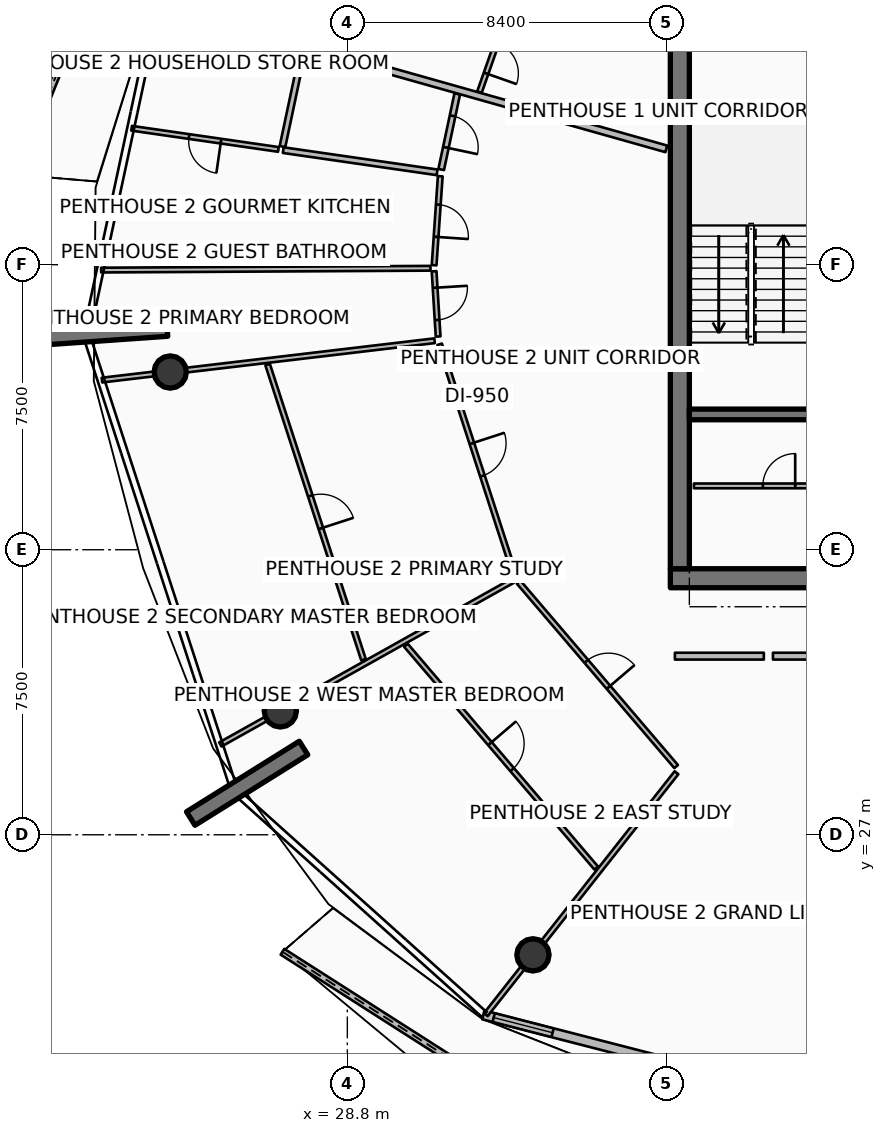
"""IFC4 building model, lengths in metres.
Left out: names, types, materials, properties, quantities, classifications, styles, units other than length and angle.
Written with IfcOpenShell. Run it as: python <this file> out.ifc"""

import sys

from ifc_helpers import new_model, si_unit, direction, frame, frame_2d, origin, origin_2d, place, context, subcontext, project, spatial, polyline, rectangle, circle, outline, extrude, element, fill, save


model = new_model("IFC4")
c1 = context("Model", 3, precision=1e-05, world=origin(), true_north=direction((0.0, 1.0)))
c2 = subcontext(c1, "Body", "Model", "MODEL_VIEW")
j1 = project(units=[si_unit("LENGTHUNIT", "METRE"), si_unit("PLANEANGLEUNIT", "RADIAN")], contexts=[c1])
p1 = place(None, origin())
s1 = spatial("IfcSite", under=j1, at=p1, CompositionType="ELEMENT")
p2 = place(p1, origin())
s2 = spatial("IfcBuilding", under=s1, at=p2, CompositionType="ELEMENT")
p3 = place(p2, frame((0.0, 0.0, 330.5)))
s3 = spatial("IfcBuildingStorey", under=s2, at=p3, CompositionType="ELEMENT", Elevation=330.5)
p4 = place(p3, frame((37.3, 33.75, 0.0), z_axis=(0.0, 0.0, 1.0), x_axis=(1.0, 0.0, 0.0)))
e1 = element("IfcWall", 1, at=p4, inside=s3, PredefinedType="SHEAR", context=c2, shape_type="SweptSolid", body=[
    extrude(rectangle(XDim=9.6, YDim=0.5, at=frame_2d((4.8, 0.0))), origin(), (0.0, 0.0, 1.0), 4.2),
])
p5 = place(p3, frame((37.55, 34.0, 0.0), z_axis=(0.0, 0.0, 1.0), x_axis=(0.0, 1.0, 0.0)))
e2 = element("IfcWall", 2, at=p5, inside=s3, PredefinedType="SHEAR", context=c2, shape_type="SweptSolid", body=[
    extrude(rectangle(XDim=16.0, YDim=0.5, at=frame_2d((8.0, 0.0))), origin(), (0.0, 0.0, 1.0), 4.2),
])
for number, where, z_axis, x_axis in (
    (3, (37.8, 38.06, 0.0), (0.0, 0.0, 1.0), (1.0, 0.0, 0.0)),
    (4, (37.8, 45.94, 0.0), (0.0, 0.0, 1.0), (1.0, 0.0, 0.0)),
):
    element("IfcWall", number, at=place(p3, frame(where, z_axis=z_axis, x_axis=x_axis)), inside=s3, PredefinedType="SHEAR", context=c2, shape_type="SweptSolid", body=[
        extrude(rectangle(XDim=3.5, YDim=0.28, at=frame_2d((1.75, 0.0))), origin(), (0.0, 0.0, 1.0), 4.2),
    ])
for number, where, z_axis, x_axis in (
    (5, (24.059, 40.326, 0.0), (0.0, 0.0, 1.0), (-0.998, -0.07, 0.0)),
    (6, (27.647, 29.282, 0.0), (0.0, 0.0, 1.0), (-0.848, -0.53, 0.0)),
):
    element("IfcWall", number, at=place(p3, frame(where, z_axis=z_axis, x_axis=x_axis)), inside=s3, PredefinedType="SOLIDWALL", context=c2, shape_type="SweptSolid", body=[
        extrude(rectangle(XDim=3.5, YDim=0.42, at=frame_2d((1.75, 0.0))), origin(), (0.0, 0.0, 1.0), 4.2),
    ])
for number, where, z_axis, x_axis in (
    (7, (24.14, 39.176, 0.0), (0.0, 0.0, 1.0), (1.0, 0.0, 0.0)),
    (8, (27.037, 30.26, 0.0), (0.0, 0.0, 1.0), (1.0, 0.0, 0.0)),
    (9, (33.684, 23.841, 0.0), (0.0, 0.0, 1.0), (1.0, 0.0, 0.0)),
):
    element("IfcColumn", number, at=place(p3, frame(where, z_axis=z_axis, x_axis=x_axis)), inside=s3, PredefinedType="COLUMN", context=c2, shape_type="SweptSolid", body=[
        extrude(circle(Radius=0.425, at=origin_2d()), origin(), (0.0, 0.0, 1.0), 3.94),
    ])
p6 = place(p3, frame((23.993, 54.098, 0.0), z_axis=(0.0, 0.0, 1.0), x_axis=(-0.372269858955, -0.928124534809, 0.0)))
e10 = element("IfcWall", 10, at=p6, inside=s3, PredefinedType="PARAPET", context=c2, shape_type="SweptSolid", body=[
    extrude(outline(polyline([(0.0, 0.0), (10.483, 0.0), (10.483, 1.497), (5.242, 1.696), (0.0, 1.832), (0.0, 0.0)])), frame((0.0, 0.09, 0.0), z_axis=(0.0, -1.0, 0.0), x_axis=(1.0, 0.0, 0.0)), (0.0, 0.0, 1.0), 0.18),
])
p7 = place(p3, frame((27.093, 23.922, 0.0), z_axis=(0.0, 0.0, 1.0), x_axis=(0.842921526724, -0.538036522725, 0.0)))
e11 = element("IfcWall", 11, at=p7, inside=s3, PredefinedType="PARAPET", context=c2, shape_type="SweptSolid", body=[
    extrude(outline(polyline([(0.0, 0.0), (10.35, 0.0), (10.35, 1.632), (5.175, 1.418), (0.0, 1.233), (0.0, 0.0)])), frame((0.0, 0.09, 0.0), z_axis=(0.0, -1.0, 0.0), x_axis=(1.0, 0.0, 0.0)), (0.0, 0.0, 1.0), 0.18),
])
p8 = place(p3, frame((32.38, 22.26, 0.0), z_axis=(0.0, 0.0, 1.0), x_axis=(0.968389062354, -0.249444630957, 0.0)))
e12 = element("IfcWall", 12, at=p8, inside=s3, PredefinedType="SOLIDWALL", context=c2, shape_type="SweptSolid", body=[
    extrude(rectangle(XDim=9.678, YDim=0.24, at=frame_2d((4.839, 0.0))), origin(), (0.0, 0.0, 1.0), 2.89),
])
p9 = place(p8, frame((7.458, 0.0, 0.0)))
e13 = element("IfcOpeningElement", 13, at=p9, cuts=e12, PredefinedType="OPENING", context=c2, shape_type="SweptSolid", body=[
    extrude(rectangle(XDim=1.45, YDim=2.15, at=frame_2d((0.725, 1.075))), frame((0.0, 0.13, 0.0), z_axis=(0.0, -1.0, 0.0), x_axis=(1.0, 0.0, 0.0)), (0.0, 0.0, 1.0), 0.26),
])
p10 = place(p8, frame((0.28, 0.0, 0.65)))
e14 = element("IfcOpeningElement", 14, at=p10, cuts=e12, PredefinedType="OPENING", context=c2, shape_type="SweptSolid", body=[
    extrude(rectangle(XDim=1.6, YDim=1.5, at=frame_2d((0.8, 0.75))), frame((0.0, 0.13, 0.0), z_axis=(0.0, -1.0, 0.0), x_axis=(1.0, 0.0, 0.0)), (0.0, 0.0, 1.0), 0.26),
])
p11 = place(p3, frame((37.92, 36.18, 0.0), z_axis=(0.0, 0.0, 1.0), x_axis=(1.0, 0.0, 0.0)))
e15 = element("IfcWall", 15, at=p11, inside=s3, PredefinedType="PARTITIONING", context=c2, shape_type="SweptSolid", body=[
    extrude(rectangle(XDim=4.48, YDim=0.125, at=frame_2d((2.24, 0.0))), origin(), (0.0, 0.0, 1.0), 3.38),
])
p12 = place(p11, frame((1.815, 0.0, 0.0)))
e16 = element("IfcOpeningElement", 16, at=p12, cuts=e15, PredefinedType="OPENING", context=c2, shape_type="SweptSolid", body=[
    extrude(rectangle(XDim=0.85, YDim=2.06, at=frame_2d((0.425, 1.03))), frame((0.0, 0.073, 0.0), z_axis=(0.0, -1.0, 0.0), x_axis=(1.0, 0.0, 0.0)), (0.0, 0.0, 1.0), 0.145),
])
p13 = place(p3, frame((37.194, 45.048, 0.0), z_axis=(0.0, 0.0, 1.0), x_axis=(-0.962457024049, 0.271434111451, 0.0)))
e17 = element("IfcWall", 17, at=p13, inside=s3, PredefinedType="PARTITIONING", context=c2, shape_type="SweptSolid", body=[
    extrude(rectangle(XDim=13.799, YDim=0.18, at=frame_2d((6.9, 0.0))), origin(), (0.0, 0.0, 1.0), 3.38),
])
p14 = place(p3, frame((32.907, 48.332, 0.0), z_axis=(0.0, 0.0, 1.0), x_axis=(-0.332128336942, -0.943234206229, 0.0)))
e18 = element("IfcWall", 18, at=p14, inside=s3, PredefinedType="PARTITIONING", context=c2, shape_type="SweptSolid", body=[
    extrude(rectangle(XDim=1.902, YDim=0.125, at=frame_2d((0.951, 0.0))), origin(), (0.0, 0.0, 1.0), 3.38),
])
p15 = place(p14, frame((0.526, 0.0, 0.0)))
e19 = element("IfcOpeningElement", 19, at=p15, cuts=e18, PredefinedType="OPENING", context=c2, shape_type="SweptSolid", body=[
    extrude(rectangle(XDim=0.85, YDim=2.06, at=frame_2d((0.425, 1.03))), frame((0.0, 0.073, 0.0), z_axis=(0.0, -1.0, 0.0), x_axis=(1.0, 0.0, 0.0)), (0.0, 0.0, 1.0), 0.145),
])
p16 = place(p3, frame((40.0, 31.7, 0.0), z_axis=(0.0, 0.0, 1.0), x_axis=(1.0, 0.0, 0.0)))
e20 = element("IfcWall", 20, at=p16, inside=s3, PredefinedType="PARTITIONING", context=c2, shape_type="SweptSolid", body=[
    extrude(rectangle(XDim=4.975, YDim=0.18, at=frame_2d((2.488, 0.0))), origin(), (0.0, 0.0, 1.0), 3.38),
])
p17 = place(p16, frame((1.938, 0.0, 0.0)))
e21 = element("IfcOpeningElement", 21, at=p17, cuts=e20, PredefinedType="OPENING", context=c2, shape_type="SweptSolid", body=[
    extrude(rectangle(XDim=1.1, YDim=2.1, at=frame_2d((0.55, 1.05))), frame((0.0, 0.1, 0.0), z_axis=(0.0, -1.0, 0.0), x_axis=(1.0, 0.0, 0.0)), (0.0, 0.0, 1.0), 0.2),
])
p18 = place(p3, frame((31.692, 46.496, 0.0), z_axis=(0.0, 0.0, 1.0), x_axis=(-0.207455496804, -0.978244456588, 0.0)))
e22 = element("IfcWall", 22, at=p18, inside=s3, PredefinedType="PARTITIONING", context=c2, shape_type="SweptSolid", body=[
    extrude(rectangle(XDim=2.035, YDim=0.15, at=frame_2d((1.017, 0.0))), origin(), (0.0, 0.0, 1.0), 3.38),
])
p19 = place(p18, frame((0.592, 0.0, 0.0)))
e23 = element("IfcOpeningElement", 23, at=p19, cuts=e22, PredefinedType="OPENING", context=c2, shape_type="SweptSolid", body=[
    extrude(rectangle(XDim=0.85, YDim=2.06, at=frame_2d((0.425, 1.03))), frame((0.0, 0.085, 0.0), z_axis=(0.0, -1.0, 0.0), x_axis=(1.0, 0.0, 0.0)), (0.0, 0.0, 1.0), 0.17),
])
p20 = place(p3, frame((27.631, 47.641, 0.0), z_axis=(0.0, 0.0, 1.0), x_axis=(-0.207597158551, -0.978214403779, 0.0)))
e24 = element("IfcWall", 24, at=p20, inside=s3, PredefinedType="PARTITIONING", context=c2, shape_type="SweptSolid", body=[
    extrude(rectangle(XDim=2.59, YDim=0.15, at=frame_2d((1.295, 0.0))), origin(), (0.0, 0.0, 1.0), 3.38),
])
p21 = place(p3, frame((31.162, 44.43, 0.0), z_axis=(0.0, 0.0, 1.0), x_axis=(-0.989744304981, 0.142850308916, 0.0)))
e25 = element("IfcWall", 25, at=p21, inside=s3, PredefinedType="PARTITIONING", context=c2, shape_type="SweptSolid", body=[
    extrude(rectangle(XDim=4.09, YDim=0.15, at=frame_2d((2.045, 0.0))), origin(), (0.0, 0.0, 1.0), 3.38),
])
p22 = place(p3, frame((26.986, 45.033, 0.0), z_axis=(0.0, 0.0, 1.0), x_axis=(-0.989744483193, 0.142849074164, 0.0)))
e26 = element("IfcWall", 26, at=p22, inside=s3, PredefinedType="PARTITIONING", context=c2, shape_type="SweptSolid", body=[
    extrude(rectangle(XDim=3.902, YDim=0.125, at=frame_2d((1.951, 0.0))), origin(), (0.0, 0.0, 1.0), 3.38),
])
p23 = place(p22, frame((1.526, 0.0, 0.0)))
e27 = element("IfcOpeningElement", 27, at=p23, cuts=e26, PredefinedType="OPENING", context=c2, shape_type="SweptSolid", body=[
    extrude(rectangle(XDim=0.85, YDim=2.06, at=frame_2d((0.425, 1.03))), frame((0.0, 0.073, 0.0), z_axis=(0.0, -1.0, 0.0), x_axis=(1.0, 0.0, 0.0)), (0.0, 0.0, 1.0), 0.145),
])
p24 = place(p3, frame((30.988, 41.906, 0.0), z_axis=(0.0, 0.0, 1.0), x_axis=(-0.999984908948, -0.005493803382, 0.0)))
e28 = element("IfcWall", 28, at=p24, inside=s3, PredefinedType="PARTITIONING", context=c2, shape_type="SweptSolid", body=[
    extrude(rectangle(XDim=8.666, YDim=0.125, at=frame_2d((4.333, 0.0))), origin(), (0.0, 0.0, 1.0), 3.38),
])
p25 = place(p3, frame((31.245, 44.327, 0.0), z_axis=(0.0, 0.0, 1.0), x_axis=(-0.068873502497, -0.997625400967, 0.0)))
e29 = element("IfcWall", 29, at=p25, inside=s3, PredefinedType="PARTITIONING", context=c2, shape_type="SweptSolid", body=[
    extrude(rectangle(XDim=2.347, YDim=0.125, at=frame_2d((1.173, 0.0))), origin(), (0.0, 0.0, 1.0), 3.38),
])
p26 = place(p25, frame((0.748, 0.0, 0.0)))
e30 = element("IfcOpeningElement", 30, at=p26, cuts=e29, PredefinedType="OPENING", context=c2, shape_type="SweptSolid", body=[
    extrude(rectangle(XDim=0.85, YDim=2.06, at=frame_2d((0.425, 1.03))), frame((0.0, 0.073, 0.0), z_axis=(0.0, -1.0, 0.0), x_axis=(1.0, 0.0, 0.0)), (0.0, 0.0, 1.0), 0.145),
])
p27 = place(p3, frame((31.083, 41.827, 0.0), z_axis=(0.0, 0.0, 1.0), x_axis=(0.061626842896, -0.998099259711, 0.0)))
e31 = element("IfcWall", 31, at=p27, inside=s3, PredefinedType="PARTITIONING", context=c2, shape_type="SweptSolid", body=[
    extrude(rectangle(XDim=1.719, YDim=0.125, at=frame_2d((0.86, 0.0))), origin(), (0.0, 0.0, 1.0), 3.38),
])
p28 = place(p27, frame((0.435, 0.0, 0.0)))
e32 = element("IfcOpeningElement", 32, at=p28, cuts=e31, PredefinedType="OPENING", context=c2, shape_type="SweptSolid", body=[
    extrude(rectangle(XDim=0.85, YDim=2.06, at=frame_2d((0.425, 1.03))), frame((0.0, 0.073, 0.0), z_axis=(0.0, -1.0, 0.0), x_axis=(1.0, 0.0, 0.0)), (0.0, 0.0, 1.0), 0.145),
])
p29 = place(p3, frame((31.096, 39.999, 0.0), z_axis=(0.0, 0.0, 1.0), x_axis=(-0.993069250604, -0.117530691761, 0.0)))
e33 = element("IfcWall", 33, at=p29, inside=s3, PredefinedType="PARTITIONING", context=c2, shape_type="SweptSolid", body=[
    extrude(rectangle(XDim=8.814, YDim=0.125, at=frame_2d((4.407, 0.0))), origin(), (0.0, 0.0, 1.0), 3.38),
])
p30 = place(p3, frame((31.229, 39.906, 0.0), z_axis=(0.0, 0.0, 1.0), x_axis=(0.309023798792, -0.951054305379, 0.0)))
e34 = element("IfcWall", 34, at=p30, inside=s3, PredefinedType="PARTITIONING", context=c2, shape_type="SweptSolid", body=[
    extrude(rectangle(XDim=6.383, YDim=0.125, at=frame_2d((3.191, 0.0))), origin(), (0.0, 0.0, 1.0), 3.38),
])
p31 = place(p30, frame((2.741, 0.0, 0.0)))
e35 = element("IfcOpeningElement", 35, at=p31, cuts=e34, PredefinedType="OPENING", context=c2, shape_type="SweptSolid", body=[
    extrude(rectangle(XDim=0.9, YDim=2.08, at=frame_2d((0.45, 1.04))), frame((0.0, 0.073, 0.0), z_axis=(0.0, -1.0, 0.0), x_axis=(1.0, 0.0, 0.0)), (0.0, 0.0, 1.0), 0.145),
])
p32 = place(p3, frame((26.703, 39.371, 0.0), z_axis=(0.0, 0.0, 1.0), x_axis=(0.309021134762, -0.951055170992, 0.0)))
e36 = element("IfcWall", 36, at=p32, inside=s3, PredefinedType="PARTITIONING", context=c2, shape_type="SweptSolid", body=[
    extrude(rectangle(XDim=8.161, YDim=0.125, at=frame_2d((4.081, 0.0))), origin(), (0.0, 0.0, 1.0), 3.38),
])
p33 = place(p32, frame((3.631, 0.0, 0.0)))
e37 = element("IfcOpeningElement", 37, at=p33, cuts=e36, PredefinedType="OPENING", context=c2, shape_type="SweptSolid", body=[
    extrude(rectangle(XDim=0.9, YDim=2.08, at=frame_2d((0.45, 1.04))), frame((0.0, 0.073, 0.0), z_axis=(0.0, -1.0, 0.0), x_axis=(1.0, 0.0, 0.0)), (0.0, 0.0, 1.0), 0.145),
])
p34 = place(p3, frame((37.42, 31.7, 0.0), z_axis=(0.0, 0.0, 1.0), x_axis=(1.0, 0.0, 0.0)))
e38 = element("IfcWall", 38, at=p34, inside=s3, PredefinedType="PARTITIONING", context=c2, shape_type="SweptSolid", body=[
    extrude(rectangle(XDim=2.34, YDim=0.18, at=frame_2d((1.17, 0.0))), origin(), (0.0, 0.0, 1.0), 3.38),
])
p35 = place(p3, frame((33.148, 33.683, 0.0), z_axis=(0.0, 0.0, 1.0), x_axis=(-0.872504598877, -0.488605899409, 0.0)))
e39 = element("IfcWall", 39, at=p35, inside=s3, PredefinedType="PARTITIONING", context=c2, shape_type="SweptSolid", body=[
    extrude(rectangle(XDim=8.814, YDim=0.125, at=frame_2d((4.407, 0.0))), origin(), (0.0, 0.0, 1.0), 3.38),
])
p36 = place(p3, frame((37.462, 28.632, 0.0), z_axis=(0.0, 0.0, 1.0), x_axis=(-0.619099165969, -0.78531281837, 0.0)))
e40 = element("IfcWall", 40, at=p36, inside=s3, PredefinedType="PARTITIONING", context=c2, shape_type="SweptSolid", body=[
    extrude(rectangle(XDim=8.105, YDim=0.125, at=frame_2d((4.052, 0.0))), origin(), (0.0, 0.0, 1.0), 3.38),
])
p37 = place(p3, frame((33.307, 33.648, 0.0), z_axis=(0.0, 0.0, 1.0), x_axis=(0.649467421322, -0.760389419075, 0.0)))
e41 = element("IfcWall", 41, at=p37, inside=s3, PredefinedType="PARTITIONING", context=c2, shape_type="SweptSolid", body=[
    extrude(rectangle(XDim=6.383, YDim=0.125, at=frame_2d((3.191, 0.0))), origin(), (0.0, 0.0, 1.0), 3.38),
])
p38 = place(p37, frame((2.741, 0.0, 0.0)))
e42 = element("IfcOpeningElement", 42, at=p38, cuts=e41, PredefinedType="OPENING", context=c2, shape_type="SweptSolid", body=[
    extrude(rectangle(XDim=0.9, YDim=2.08, at=frame_2d((0.45, 1.04))), frame((0.0, 0.073, 0.0), z_axis=(0.0, -1.0, 0.0), x_axis=(1.0, 0.0, 0.0)), (0.0, 0.0, 1.0), 0.145),
])
p39 = place(p3, frame((30.341, 31.987, 0.0), z_axis=(0.0, 0.0, 1.0), x_axis=(0.649457620817, -0.760397789819, 0.0)))
e43 = element("IfcWall", 43, at=p39, inside=s3, PredefinedType="PARTITIONING", context=c2, shape_type="SweptSolid", body=[
    extrude(rectangle(XDim=7.709, YDim=0.125, at=frame_2d((3.854, 0.0))), origin(), (0.0, 0.0, 1.0), 3.38),
])
p40 = place(p39, frame((3.405, 0.0, 0.0)))
e44 = element("IfcOpeningElement", 44, at=p40, cuts=e43, PredefinedType="OPENING", context=c2, shape_type="SweptSolid", body=[
    extrude(rectangle(XDim=0.9, YDim=2.08, at=frame_2d((0.45, 1.04))), frame((0.0, 0.073, 0.0), z_axis=(0.0, -1.0, 0.0), x_axis=(1.0, 0.0, 0.0)), (0.0, 0.0, 1.0), 0.145),
])
p41 = place(p10, origin())
e45 = element("IfcWindow", 45, at=p41, inside=s3, PartitioningType="SINGLE_PANEL", PredefinedType="WINDOW", context=c2, shape_type="SweptSolid", body=[
    extrude(rectangle(XDim=1.6, YDim=1.5, at=frame_2d((0.8, 0.75))), frame((0.0, 0.03, 0.0), z_axis=(0.0, -1.0, 0.0), x_axis=(1.0, 0.0, 0.0)), (0.0, 0.0, 1.0), 0.06),
])
fill(e14, e45)
p42 = place(p12, origin())
e46 = element("IfcDoor", 46, at=p42, inside=s3, OperationType="SINGLE_SWING_RIGHT", PredefinedType="DOOR", context=c2, shape_type="SweptSolid", body=[
    extrude(rectangle(XDim=0.85, YDim=2.06, at=frame_2d((0.425, 1.03))), frame((0.0, 0.025, 0.0), z_axis=(0.0, -1.0, 0.0), x_axis=(1.0, 0.0, 0.0)), (0.0, 0.0, 1.0), 0.05),
])
fill(e16, e46)
p43 = place(p15, origin())
e47 = element("IfcDoor", 47, at=p43, inside=s3, OperationType="SINGLE_SWING_RIGHT", PredefinedType="DOOR", context=c2, shape_type="SweptSolid", body=[
    extrude(rectangle(XDim=0.85, YDim=2.06, at=frame_2d((0.425, 1.03))), frame((0.0, 0.025, 0.0), z_axis=(0.0, -1.0, 0.0), x_axis=(1.0, 0.0, 0.0)), (0.0, 0.0, 1.0), 0.05),
])
fill(e19, e47)
p44 = place(p19, origin())
e48 = element("IfcDoor", 48, at=p44, inside=s3, OperationType="SINGLE_SWING_RIGHT", PredefinedType="DOOR", context=c2, shape_type="SweptSolid", body=[
    extrude(rectangle(XDim=0.85, YDim=2.06, at=frame_2d((0.425, 1.03))), frame((0.0, 0.025, 0.0), z_axis=(0.0, -1.0, 0.0), x_axis=(1.0, 0.0, 0.0)), (0.0, 0.0, 1.0), 0.05),
])
fill(e23, e48)
p45 = place(p23, origin())
e49 = element("IfcDoor", 49, at=p45, inside=s3, OperationType="SINGLE_SWING_LEFT", PredefinedType="DOOR", context=c2, shape_type="SweptSolid", body=[
    extrude(rectangle(XDim=0.85, YDim=2.06, at=frame_2d((0.425, 1.03))), frame((0.0, 0.025, 0.0), z_axis=(0.0, -1.0, 0.0), x_axis=(1.0, 0.0, 0.0)), (0.0, 0.0, 1.0), 0.05),
])
fill(e27, e49)
p46 = place(p26, origin())
e50 = element("IfcDoor", 50, at=p46, inside=s3, OperationType="SINGLE_SWING_RIGHT", PredefinedType="DOOR", context=c2, shape_type="SweptSolid", body=[
    extrude(rectangle(XDim=0.85, YDim=2.06, at=frame_2d((0.425, 1.03))), frame((0.0, 0.025, 0.0), z_axis=(0.0, -1.0, 0.0), x_axis=(1.0, 0.0, 0.0)), (0.0, 0.0, 1.0), 0.05),
])
fill(e30, e50)
p47 = place(p28, origin())
e51 = element("IfcDoor", 51, at=p47, inside=s3, OperationType="SINGLE_SWING_LEFT", PredefinedType="DOOR", context=c2, shape_type="SweptSolid", body=[
    extrude(rectangle(XDim=0.85, YDim=2.06, at=frame_2d((0.425, 1.03))), frame((0.0, 0.025, 0.0), z_axis=(0.0, -1.0, 0.0), x_axis=(1.0, 0.0, 0.0)), (0.0, 0.0, 1.0), 0.05),
])
fill(e32, e51)
p48 = place(p31, origin())
e52 = element("IfcDoor", 52, at=p48, inside=s3, OperationType="SINGLE_SWING_LEFT", PredefinedType="DOOR", context=c2, shape_type="SweptSolid", body=[
    extrude(rectangle(XDim=0.9, YDim=2.08, at=frame_2d((0.45, 1.04))), frame((0.0, 0.025, 0.0), z_axis=(0.0, -1.0, 0.0), x_axis=(1.0, 0.0, 0.0)), (0.0, 0.0, 1.0), 0.05),
])
fill(e35, e52)
p49 = place(p33, origin())
e53 = element("IfcDoor", 53, at=p49, inside=s3, OperationType="SINGLE_SWING_RIGHT", PredefinedType="DOOR", context=c2, shape_type="SweptSolid", body=[
    extrude(rectangle(XDim=0.9, YDim=2.08, at=frame_2d((0.45, 1.04))), frame((0.0, 0.025, 0.0), z_axis=(0.0, -1.0, 0.0), x_axis=(1.0, 0.0, 0.0)), (0.0, 0.0, 1.0), 0.05),
])
fill(e37, e53)
p50 = place(p38, origin())
e54 = element("IfcDoor", 54, at=p50, inside=s3, OperationType="SINGLE_SWING_RIGHT", PredefinedType="DOOR", context=c2, shape_type="SweptSolid", body=[
    extrude(rectangle(XDim=0.9, YDim=2.08, at=frame_2d((0.45, 1.04))), frame((0.0, 0.025, 0.0), z_axis=(0.0, -1.0, 0.0), x_axis=(1.0, 0.0, 0.0)), (0.0, 0.0, 1.0), 0.05),
])
fill(e42, e54)
p51 = place(p40, origin())
e55 = element("IfcDoor", 55, at=p51, inside=s3, OperationType="SINGLE_SWING_LEFT", PredefinedType="DOOR", context=c2, shape_type="SweptSolid", body=[
    extrude(rectangle(XDim=0.9, YDim=2.08, at=frame_2d((0.45, 1.04))), frame((0.0, 0.025, 0.0), z_axis=(0.0, -1.0, 0.0), x_axis=(1.0, 0.0, 0.0)), (0.0, 0.0, 1.0), 0.05),
])
fill(e44, e55)
save(model, sys.argv[1])
